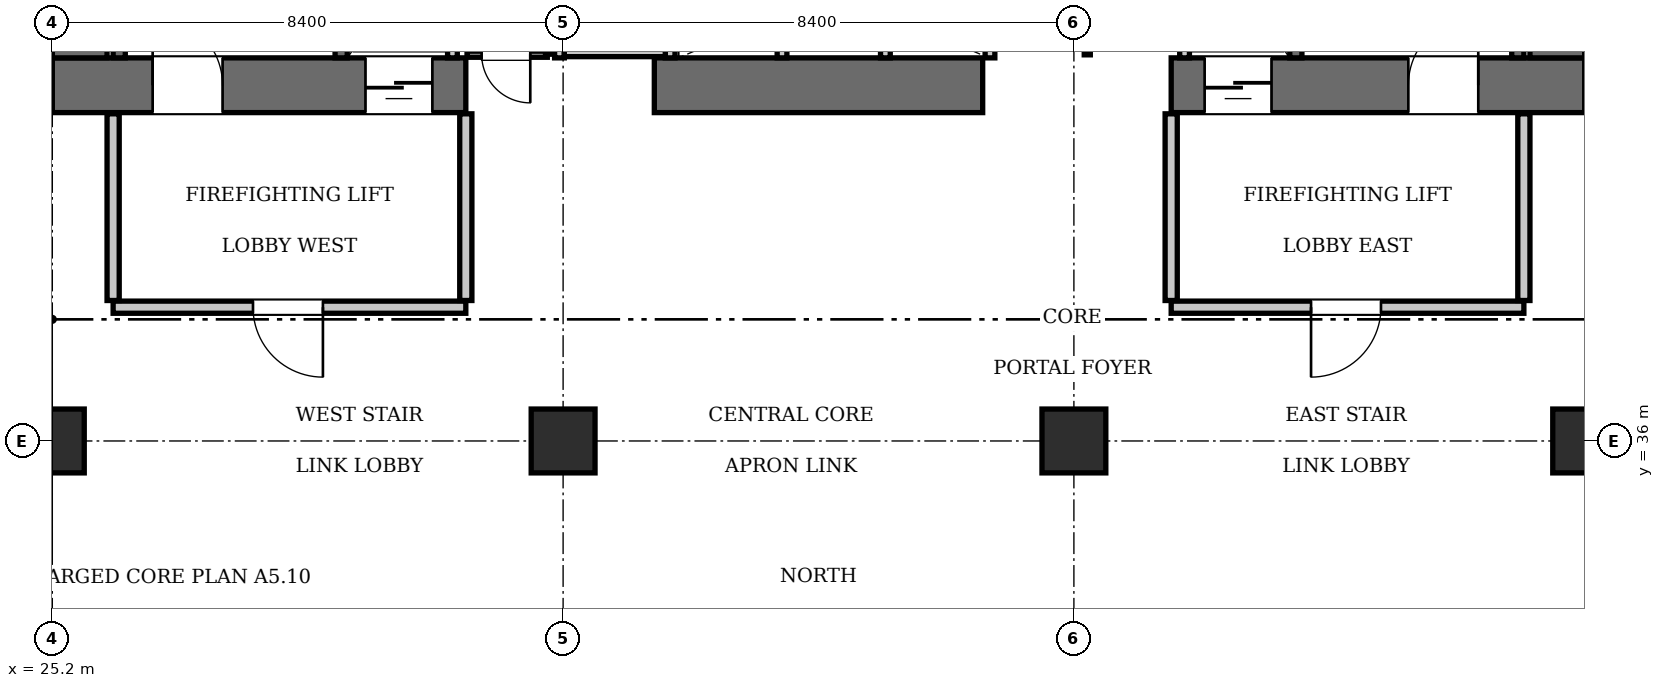
"""IFC4 building model, lengths in metres.
Left out: names, types, materials, properties, quantities, classifications, styles, units other than length and angle.
Written with IfcOpenShell. Run it as: python <this file> out.ifc"""

import sys

from ifc_helpers import new_model, si_unit, direction, frame, frame_2d, origin, origin_2d, place, context, subcontext, project, spatial, rectangle, extrude, element, fill, save


model = new_model("IFC4")
c1 = context("Model", 3, precision=1e-05, world=origin(), true_north=direction((0.0, 1.0)))
c2 = subcontext(c1, "Body", "Model", "MODEL_VIEW")
j1 = project(units=[si_unit("LENGTHUNIT", "METRE"), si_unit("PLANEANGLEUNIT", "RADIAN")], contexts=[c1])
p1 = place(None, origin())
s1 = spatial("IfcSite", under=j1, at=p1, CompositionType="ELEMENT")
p2 = place(p1, origin())
s2 = spatial("IfcBuilding", under=s1, at=p2, CompositionType="ELEMENT")
p3 = place(p2, frame((0.0, 0.0, 57.75)))
s3 = spatial("IfcBuildingStorey", under=s2, at=p3, CompositionType="ELEMENT", Elevation=57.75)
p4 = place(p3, frame((25.2, 41.85, 0.0), z_axis=(0.0, 0.0, 1.0), x_axis=(1.0, 0.0, 0.0)))
e1 = element("IfcWall", 1, at=p4, inside=s3, PredefinedType="SHEAR", context=c2, shape_type="SweptSolid", body=[
    extrude(rectangle(XDim=6.8, YDim=0.9, at=frame_2d((3.4, 0.0))), origin(), (0.0, 0.0, 1.0), 3.85),
])
p5 = place(p4, frame((1.65, 0.0, 0.0)))
e2 = element("IfcOpeningElement", 2, at=p5, cuts=e1, PredefinedType="OPENING", context=c2, shape_type="SweptSolid", body=[
    extrude(rectangle(XDim=1.15, YDim=2.15, at=frame_2d((0.575, 1.075))), frame((0.0, 0.46, 0.0), z_axis=(0.0, -1.0, 0.0), x_axis=(1.0, 0.0, 0.0)), (0.0, 0.0, 1.0), 0.92),
])
p6 = place(p4, frame((5.15, 0.0, 0.0)))
e3 = element("IfcOpeningElement", 3, at=p6, cuts=e1, PredefinedType="OPENING", context=c2, shape_type="SweptSolid", body=[
    extrude(rectangle(XDim=1.1, YDim=2.2, at=frame_2d((0.55, 1.1))), frame((0.0, 0.46, 0.0), z_axis=(0.0, -1.0, 0.0), x_axis=(1.0, 0.0, 0.0)), (0.0, 0.0, 1.0), 0.92),
])
p7 = place(p3, frame((35.1, 41.85, 0.0), z_axis=(0.0, 0.0, 1.0), x_axis=(1.0, 0.0, 0.0)))
e4 = element("IfcWall", 4, at=p7, inside=s3, PredefinedType="SHEAR", context=c2, shape_type="SweptSolid", body=[
    extrude(rectangle(XDim=5.4, YDim=0.9, at=frame_2d((2.7, 0.0))), origin(), (0.0, 0.0, 1.0), 3.85),
])
p8 = place(p3, frame((43.6, 41.85, 0.0), z_axis=(0.0, 0.0, 1.0), x_axis=(1.0, 0.0, 0.0)))
e5 = element("IfcWall", 5, at=p8, inside=s3, PredefinedType="SHEAR", context=c2, shape_type="SweptSolid", body=[
    extrude(rectangle(XDim=6.8, YDim=0.9, at=frame_2d((3.4, 0.0))), origin(), (0.0, 0.0, 1.0), 3.85),
])
p9 = place(p8, frame((3.9, 0.0, 0.0)))
e6 = element("IfcOpeningElement", 6, at=p9, cuts=e5, PredefinedType="OPENING", context=c2, shape_type="SweptSolid", body=[
    extrude(rectangle(XDim=1.15, YDim=2.15, at=frame_2d((0.575, 1.075))), frame((0.0, 0.46, 0.0), z_axis=(0.0, -1.0, 0.0), x_axis=(1.0, 0.0, 0.0)), (0.0, 0.0, 1.0), 0.92),
])
p10 = place(p8, frame((0.55, 0.0, 0.0)))
e7 = element("IfcOpeningElement", 7, at=p10, cuts=e5, PredefinedType="OPENING", context=c2, shape_type="SweptSolid", body=[
    extrude(rectangle(XDim=1.1, YDim=2.2, at=frame_2d((0.55, 1.1))), frame((0.0, 0.46, 0.0), z_axis=(0.0, -1.0, 0.0), x_axis=(1.0, 0.0, 0.0)), (0.0, 0.0, 1.0), 0.92),
])
for number, where, z_axis, x_axis in (
    (8, (25.65, 42.3, 0.0), (0.0, 0.0, 1.0), (0.0, 1.0, 0.0)),
    (9, (49.95, 42.3, 0.0), (0.0, 0.0, 1.0), (0.0, 1.0, 0.0)),
):
    element("IfcWall", number, at=place(p3, frame(where, z_axis=z_axis, x_axis=x_axis)), inside=s3, PredefinedType="SHEAR", context=c2, shape_type="SweptSolid", body=[
        extrude(rectangle(XDim=1.6, YDim=0.9, at=frame_2d((0.8, 0.0))), origin(), (0.0, 0.0, 1.0), 3.85),
    ])
for number, where, z_axis, x_axis in (
    (10, (25.2, 36.0, 0.0), (0.0, 0.0, 1.0), (1.0, 0.0, 0.0)),
    (11, (33.6, 36.0, 0.0), (0.0, 0.0, 1.0), (1.0, 0.0, 0.0)),
    (12, (42.0, 36.0, 0.0), (0.0, 0.0, 1.0), (1.0, 0.0, 0.0)),
    (13, (50.4, 36.0, 0.0), (0.0, 0.0, 1.0), (1.0, 0.0, 0.0)),
):
    element("IfcColumn", number, at=place(p3, frame(where, z_axis=z_axis, x_axis=x_axis)), inside=s3, PredefinedType="COLUMN", context=c2, shape_type="SweptSolid", body=[
        extrude(rectangle(XDim=1.05, YDim=1.05, at=origin_2d()), origin(), (0.0, 0.0, 1.0), 3.85),
    ])
p11 = place(p3, frame((29.95, 42.3, 0.0), z_axis=(0.0, 0.0, 1.0), x_axis=(0.0, 1.0, 0.0)))
e14 = element("IfcWall", 14, at=p11, inside=s3, PredefinedType="SOLIDWALL", context=c2, shape_type="SweptSolid", body=[
    extrude(rectangle(XDim=8.85, YDim=0.2, at=frame_2d((4.425, 0.0))), origin(), (0.0, 0.0, 1.0), 3.61),
])
p12 = place(p3, frame((26.3, 42.3, 0.0), z_axis=(0.0, 0.0, 1.0), x_axis=(0.0, 1.0, 0.0)))
e15 = element("IfcWall", 15, at=p12, inside=s3, PredefinedType="SOLIDWALL", context=c2, shape_type="SweptSolid", body=[
    extrude(rectangle(XDim=1.58, YDim=0.2, at=frame_2d((0.79, 0.0))), origin(), (0.0, 0.0, 1.0), 3.61),
])
p13 = place(p3, frame((45.65, 42.3, 0.0), z_axis=(0.0, 0.0, 1.0), x_axis=(0.0, 1.0, 0.0)))
e16 = element("IfcWall", 16, at=p13, inside=s3, PredefinedType="SOLIDWALL", context=c2, shape_type="SweptSolid", body=[
    extrude(rectangle(XDim=8.85, YDim=0.2, at=frame_2d((4.425, 0.0))), origin(), (0.0, 0.0, 1.0), 3.61),
])
p14 = place(p3, frame((49.3, 42.3, 0.0), z_axis=(0.0, 0.0, 1.0), x_axis=(0.0, 1.0, 0.0)))
e17 = element("IfcWall", 17, at=p14, inside=s3, PredefinedType="SOLIDWALL", context=c2, shape_type="SweptSolid", body=[
    extrude(rectangle(XDim=1.58, YDim=0.2, at=frame_2d((0.79, 0.0))), origin(), (0.0, 0.0, 1.0), 3.61),
])
for number, where, z_axis, x_axis in (
    (18, (31.78, 42.3, 0.0), (0.0, 0.0, 1.0), (0.0, 1.0, 0.0)),
    (19, (43.82, 42.3, 0.0), (0.0, 0.0, 1.0), (0.0, 1.0, 0.0)),
):
    element("IfcWall", number, at=place(p3, frame(where, z_axis=z_axis, x_axis=x_axis)), inside=s3, PredefinedType="SOLIDWALL", context=c2, shape_type="SweptSolid", body=[
        extrude(rectangle(XDim=2.44, YDim=0.16, at=frame_2d((1.22, 0.0))), origin(), (0.0, 0.0, 1.0), 3.61),
    ])
for number, where, z_axis, x_axis in (
    (20, (37.2, 42.3, 0.0), (0.0, 0.0, 1.0), (0.0, 1.0, 0.0)),
    (21, (38.9, 42.3, 0.0), (0.0, 0.0, 1.0), (0.0, 1.0, 0.0)),
    (22, (40.62, 42.3, 0.0), (0.0, 0.0, 1.0), (0.0, 1.0, 0.0)),
):
    element("IfcWall", number, at=place(p3, frame(where, z_axis=z_axis, x_axis=x_axis)), inside=s3, PredefinedType="SOLIDWALL", context=c2, shape_type="SweptSolid", body=[
        extrude(rectangle(XDim=2.05, YDim=0.16, at=frame_2d((1.025, 0.0))), origin(), (0.0, 0.0, 1.0), 3.61),
    ])
for number, where, z_axis, x_axis in (
    (23, (33.54, 42.3, 0.0), (0.0, 0.0, 1.0), (0.0, 1.0, 0.0)),
    (24, (35.36, 42.3, 0.0), (0.0, 0.0, 1.0), (0.0, 1.0, 0.0)),
):
    element("IfcWall", number, at=place(p3, frame(where, z_axis=z_axis, x_axis=x_axis)), inside=s3, PredefinedType="SOLIDWALL", context=c2, shape_type="SweptSolid", body=[
        extrude(rectangle(XDim=2.1, YDim=0.16, at=frame_2d((1.05, 0.0))), origin(), (0.0, 0.0, 1.0), 3.61),
    ])
p15 = place(p3, frame((33.62, 42.4, 0.0), z_axis=(0.0, 0.0, 1.0), x_axis=(1.0, 0.0, 0.0)))
e25 = element("IfcWall", 25, at=p15, inside=s3, PredefinedType="SOLIDWALL", context=c2, shape_type="SweptSolid", body=[
    extrude(rectangle(XDim=1.66, YDim=0.16, at=frame_2d((0.83, 0.0))), origin(), (0.0, 0.0, 1.0), 3.61),
])
p16 = place(p3, frame((26.2, 38.2, 0.0), z_axis=(0.0, 0.0, 1.0), x_axis=(1.0, 0.0, 0.0)))
e26 = element("IfcWall", 26, at=p16, inside=s3, PredefinedType="PARTITIONING", context=c2, shape_type="SweptSolid", body=[
    extrude(rectangle(XDim=5.8, YDim=0.2, at=frame_2d((2.9, 0.0))), origin(), (0.0, 0.0, 1.0), 3.61),
])
p17 = place(p16, frame((2.3, 0.0, 0.0)))
e27 = element("IfcOpeningElement", 27, at=p17, cuts=e26, PredefinedType="OPENING", context=c2, shape_type="SweptSolid", body=[
    extrude(rectangle(XDim=1.15, YDim=2.15, at=frame_2d((0.575, 1.075))), frame((0.0, 0.11, 0.0), z_axis=(0.0, -1.0, 0.0), x_axis=(1.0, 0.0, 0.0)), (0.0, 0.0, 1.0), 0.22),
])
for number, where, z_axis, x_axis in (
    (28, (26.2, 38.31, 0.0), (0.0, 0.0, 1.0), (0.0, 1.0, 0.0)),
    (29, (32.0, 38.31, 0.0), (0.0, 0.0, 1.0), (0.0, 1.0, 0.0)),
):
    element("IfcWall", number, at=place(p3, frame(where, z_axis=z_axis, x_axis=x_axis)), inside=s3, PredefinedType="PARTITIONING", context=c2, shape_type="SweptSolid", body=[
        extrude(rectangle(XDim=3.07, YDim=0.2, at=frame_2d((1.535, 0.0))), origin(), (0.0, 0.0, 1.0), 3.61),
    ])
p18 = place(p3, frame((43.6, 38.2, 0.0), z_axis=(0.0, 0.0, 1.0), x_axis=(1.0, 0.0, 0.0)))
e30 = element("IfcWall", 30, at=p18, inside=s3, PredefinedType="PARTITIONING", context=c2, shape_type="SweptSolid", body=[
    extrude(rectangle(XDim=5.8, YDim=0.2, at=frame_2d((2.9, 0.0))), origin(), (0.0, 0.0, 1.0), 3.61),
])
p19 = place(p18, frame((2.3, 0.0, 0.0)))
e31 = element("IfcOpeningElement", 31, at=p19, cuts=e30, PredefinedType="OPENING", context=c2, shape_type="SweptSolid", body=[
    extrude(rectangle(XDim=1.15, YDim=2.15, at=frame_2d((0.575, 1.075))), frame((0.0, 0.11, 0.0), z_axis=(0.0, -1.0, 0.0), x_axis=(1.0, 0.0, 0.0)), (0.0, 0.0, 1.0), 0.22),
])
for number, where, z_axis, x_axis in (
    (32, (43.6, 38.31, 0.0), (0.0, 0.0, 1.0), (0.0, 1.0, 0.0)),
    (33, (49.4, 38.31, 0.0), (0.0, 0.0, 1.0), (0.0, 1.0, 0.0)),
):
    element("IfcWall", number, at=place(p3, frame(where, z_axis=z_axis, x_axis=x_axis)), inside=s3, PredefinedType="PARTITIONING", context=c2, shape_type="SweptSolid", body=[
        extrude(rectangle(XDim=3.07, YDim=0.2, at=frame_2d((1.535, 0.0))), origin(), (0.0, 0.0, 1.0), 3.61),
    ])
p20 = place(p3, frame((32.02, 42.36, 0.0), z_axis=(0.0, 0.0, 1.0), x_axis=(1.0, 0.0, 0.0)))
e34 = element("IfcWall", 34, at=p20, inside=s3, PredefinedType="PARTITIONING", context=c2, shape_type="SweptSolid", body=[
    extrude(rectangle(XDim=1.32, YDim=0.1, at=frame_2d((0.66, 0.0))), origin(), (0.0, 0.0, 1.0), 3.61),
])
p21 = place(p20, frame((0.24, 0.0, 0.0)))
e35 = element("IfcOpeningElement", 35, at=p21, cuts=e34, PredefinedType="OPENING", context=c2, shape_type="SweptSolid", body=[
    extrude(rectangle(XDim=0.8, YDim=2.05, at=frame_2d((0.4, 1.025))), frame((0.0, 0.06, 0.0), z_axis=(0.0, -1.0, 0.0), x_axis=(1.0, 0.0, 0.0)), (0.0, 0.0, 1.0), 0.12),
])
p22 = place(p3, frame((33.36, 42.36, 0.0), z_axis=(0.0, 0.0, 1.0), x_axis=(0.0, 1.0, 0.0)))
e36 = element("IfcWall", 36, at=p22, inside=s3, PredefinedType="PARTITIONING", context=c2, shape_type="SweptSolid", body=[
    extrude(rectangle(XDim=2.58, YDim=0.1, at=frame_2d((1.29, 0.0))), origin(), (0.0, 0.0, 1.0), 3.61),
])
p23 = place(p3, frame((42.22, 42.35, 0.0), z_axis=(0.0, 0.0, 1.0), x_axis=(0.0, 1.0, 0.0)))
e37 = element("IfcWall", 37, at=p23, inside=s3, PredefinedType="PARTITIONING", context=c2, shape_type="SweptSolid", body=[
    extrude(rectangle(XDim=2.61, YDim=0.1, at=frame_2d((1.305, 0.0))), origin(), (0.0, 0.0, 1.0), 3.61),
])
p24 = place(p23, frame((0.65, 0.0, 0.0)))
e38 = element("IfcOpeningElement", 38, at=p24, cuts=e37, PredefinedType="OPENING", context=c2, shape_type="SweptSolid", body=[
    extrude(rectangle(XDim=0.8, YDim=2.05, at=frame_2d((0.4, 1.025))), frame((0.0, 0.06, 0.0), z_axis=(0.0, -1.0, 0.0), x_axis=(1.0, 0.0, 0.0)), (0.0, 0.0, 1.0), 0.12),
])
p25 = place(p5, origin())
e39 = element("IfcDoor", 39, at=p25, inside=s3, OperationType="SINGLE_SWING_LEFT", PredefinedType="DOOR", context=c2, shape_type="SweptSolid", body=[
    extrude(rectangle(XDim=1.15, YDim=2.15, at=frame_2d((0.575, 1.075))), frame((0.0, 0.025, 0.0), z_axis=(0.0, -1.0, 0.0), x_axis=(1.0, 0.0, 0.0)), (0.0, 0.0, 1.0), 0.05),
])
fill(e2, e39)
p26 = place(p9, origin())
e40 = element("IfcDoor", 40, at=p26, inside=s3, OperationType="SINGLE_SWING_RIGHT", PredefinedType="DOOR", context=c2, shape_type="SweptSolid", body=[
    extrude(rectangle(XDim=1.15, YDim=2.15, at=frame_2d((0.575, 1.075))), frame((0.0, 0.025, 0.0), z_axis=(0.0, -1.0, 0.0), x_axis=(1.0, 0.0, 0.0)), (0.0, 0.0, 1.0), 0.05),
])
fill(e6, e40)
p27 = place(p6, frame((1.1, 0.0, 0.0), z_axis=(0.0, 0.0, 1.0), x_axis=(-1.0, 0.0, 0.0)))
e41 = element("IfcDoor", 41, at=p27, inside=s3, OperationType="SLIDING_TO_LEFT", PredefinedType="DOOR", context=c2, shape_type="SweptSolid", body=[
    extrude(rectangle(XDim=1.1, YDim=2.2, at=frame_2d((0.55, 1.1))), frame((0.0, 0.025, 0.0), z_axis=(0.0, -1.0, 0.0), x_axis=(1.0, 0.0, 0.0)), (0.0, 0.0, 1.0), 0.05),
])
fill(e3, e41)
p28 = place(p10, frame((1.1, 0.0, 0.0), z_axis=(0.0, 0.0, 1.0), x_axis=(-1.0, 0.0, 0.0)))
e42 = element("IfcDoor", 42, at=p28, inside=s3, OperationType="SLIDING_TO_LEFT", PredefinedType="DOOR", context=c2, shape_type="SweptSolid", body=[
    extrude(rectangle(XDim=1.1, YDim=2.2, at=frame_2d((0.55, 1.1))), frame((0.0, 0.025, 0.0), z_axis=(0.0, -1.0, 0.0), x_axis=(1.0, 0.0, 0.0)), (0.0, 0.0, 1.0), 0.05),
])
fill(e7, e42)
p29 = place(p17, frame((1.15, 0.0, 0.0), z_axis=(0.0, 0.0, 1.0), x_axis=(-1.0, 0.0, 0.0)))
e43 = element("IfcDoor", 43, at=p29, inside=s3, OperationType="SINGLE_SWING_LEFT", PredefinedType="DOOR", context=c2, shape_type="SweptSolid", body=[
    extrude(rectangle(XDim=1.15, YDim=2.15, at=frame_2d((0.575, 1.075))), frame((0.0, 0.025, 0.0), z_axis=(0.0, -1.0, 0.0), x_axis=(1.0, 0.0, 0.0)), (0.0, 0.0, 1.0), 0.05),
])
fill(e27, e43)
p30 = place(p19, frame((1.15, 0.0, 0.0), z_axis=(0.0, 0.0, 1.0), x_axis=(-1.0, 0.0, 0.0)))
e44 = element("IfcDoor", 44, at=p30, inside=s3, OperationType="SINGLE_SWING_RIGHT", PredefinedType="DOOR", context=c2, shape_type="SweptSolid", body=[
    extrude(rectangle(XDim=1.15, YDim=2.15, at=frame_2d((0.575, 1.075))), frame((0.0, 0.025, 0.0), z_axis=(0.0, -1.0, 0.0), x_axis=(1.0, 0.0, 0.0)), (0.0, 0.0, 1.0), 0.05),
])
fill(e31, e44)
p31 = place(p21, frame((0.8, 0.0, 0.0), z_axis=(0.0, 0.0, 1.0), x_axis=(-1.0, 0.0, 0.0)))
e45 = element("IfcDoor", 45, at=p31, inside=s3, OperationType="SINGLE_SWING_LEFT", PredefinedType="DOOR", context=c2, shape_type="SweptSolid", body=[
    extrude(rectangle(XDim=0.8, YDim=2.05, at=frame_2d((0.4, 1.025))), frame((0.0, 0.025, 0.0), z_axis=(0.0, -1.0, 0.0), x_axis=(1.0, 0.0, 0.0)), (0.0, 0.0, 1.0), 0.05),
])
fill(e35, e45)
save(model, sys.argv[1])
